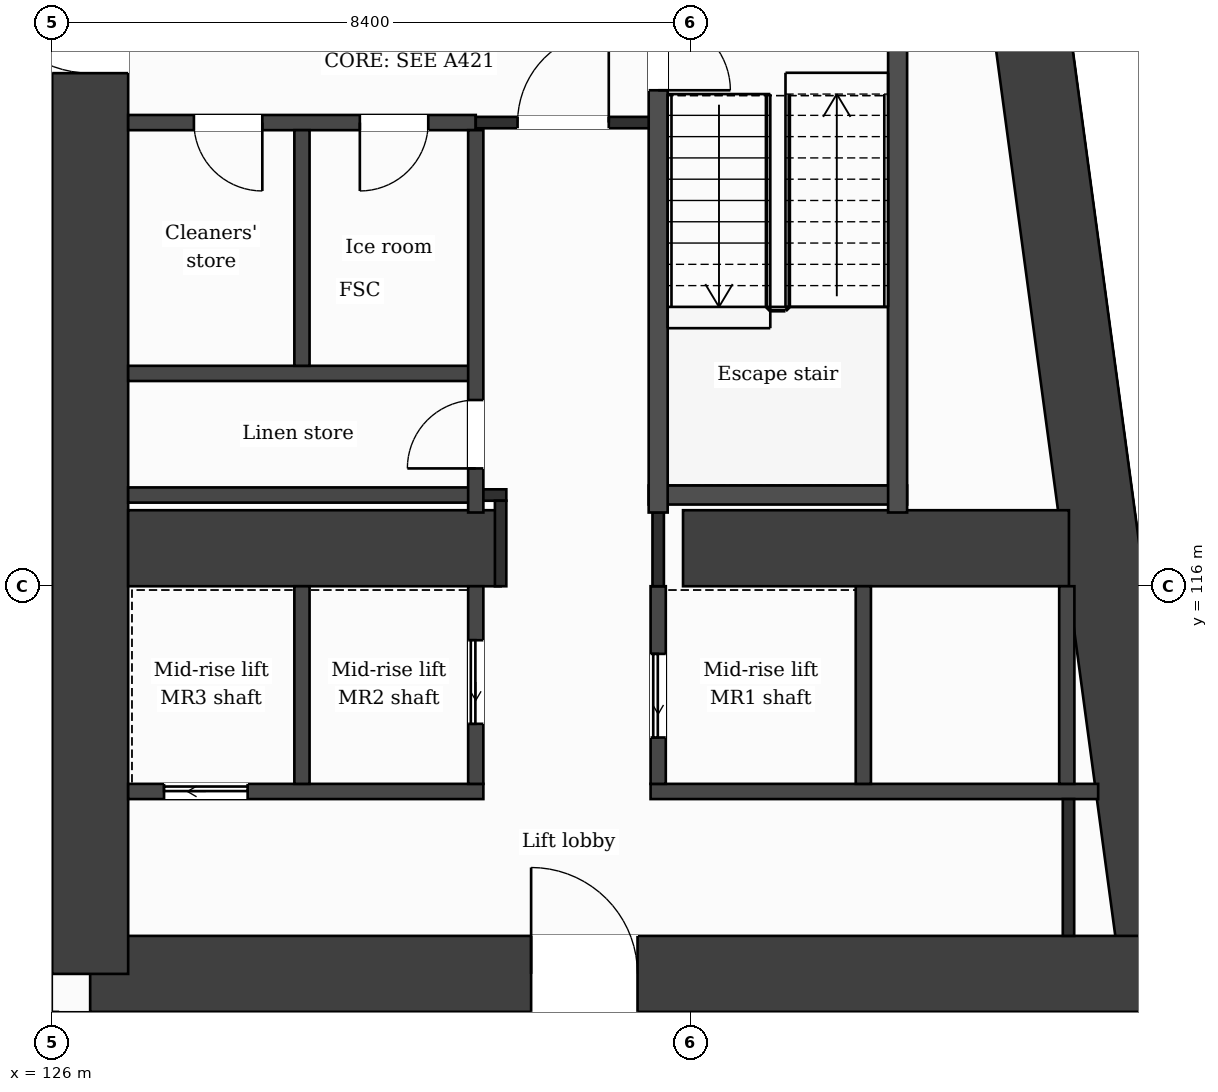
"""IFC4 building model, lengths in metres.
Left out: names, types, materials, properties, quantities, classifications, styles, units other than length and angle.
Written with IfcOpenShell. Run it as: python <this file> out.ifc"""

import sys

from ifc_helpers import new_model, si_unit, direction, frame, frame_2d, origin, place, context, subcontext, project, spatial, rectangle, extrude, element, fill, save


model = new_model("IFC4")
c1 = context("Model", 3, precision=1e-05, world=origin(), true_north=direction((0.0, 1.0)))
c2 = subcontext(c1, "Body", "Model", "MODEL_VIEW")
j1 = project(units=[si_unit("LENGTHUNIT", "METRE"), si_unit("PLANEANGLEUNIT", "RADIAN")], contexts=[c1])
p1 = place(None, origin())
s1 = spatial("IfcSite", under=j1, at=p1, CompositionType="ELEMENT")
p2 = place(p1, origin())
s2 = spatial("IfcBuilding", under=s1, at=p2, CompositionType="ELEMENT")
p3 = place(p2, frame((0.0, 0.0, 91.0)))
s3 = spatial("IfcBuildingStorey", under=s2, at=p3, CompositionType="ELEMENT", Elevation=91.0)
p4 = place(p3, frame((137.732, 131.9, 0.0), z_axis=(0.0, 0.0, 1.0), x_axis=(0.133411141623, -0.991060778808, 0.0)))
e1 = element("IfcWall", 1, at=p4, inside=s3, PredefinedType="SHEAR", context=c2, shape_type="SweptSolid", body=[
    extrude(rectangle(XDim=21.189, YDim=1.0, at=frame_2d((10.595, 0.0))), origin(), (0.0, 0.0, 1.0), 3.7),
])
p5 = place(p3, frame((140.559, 110.9, 0.0), z_axis=(0.0, 0.0, 1.0), x_axis=(-1.0, 0.0, 0.0)))
e2 = element("IfcWall", 2, at=p5, inside=s3, PredefinedType="SHEAR", context=c2, shape_type="SweptSolid", body=[
    extrude(rectangle(XDim=14.059, YDim=1.0, at=frame_2d((7.029, 0.0))), origin(), (0.0, 0.0, 1.0), 3.7),
])
p6 = place(p5, frame((6.858, 0.0, 0.0)))
e3 = element("IfcOpeningElement", 3, at=p6, cuts=e2, PredefinedType="OPENING", context=c2, shape_type="SweptSolid", body=[
    extrude(rectangle(XDim=1.4, YDim=2.1, at=frame_2d((0.7, 1.05))), frame((0.0, 0.51, 0.0), z_axis=(0.0, -1.0, 0.0), x_axis=(1.0, 0.0, 0.0)), (0.0, 0.0, 1.0), 1.02),
])
p7 = place(p3, frame((126.5, 110.9, 0.0), z_axis=(0.0, 0.0, 1.0), x_axis=(0.0, 1.0, 0.0)))
e4 = element("IfcWall", 4, at=p7, inside=s3, PredefinedType="SHEAR", context=c2, shape_type="SweptSolid", body=[
    extrude(rectangle(XDim=21.0, YDim=1.0, at=frame_2d((10.5, 0.0))), origin(), (0.0, 0.0, 1.0), 3.7),
])
p8 = place(p7, frame((11.85, 0.0, 0.0)))
e5 = element("IfcOpeningElement", 5, at=p8, cuts=e4, PredefinedType="OPENING", context=c2, shape_type="SweptSolid", body=[
    extrude(rectangle(XDim=1.4, YDim=2.1, at=frame_2d((0.7, 1.05))), frame((0.0, 0.51, 0.0), z_axis=(0.0, -1.0, 0.0), x_axis=(1.0, 0.0, 0.0)), (0.0, 0.0, 1.0), 1.02),
])
p9 = place(p3, frame((127.0, 116.5, 0.0), z_axis=(0.0, 0.0, 1.0), x_axis=(1.0, 0.0, 0.0)))
e6 = element("IfcWall", 6, at=p9, inside=s3, PredefinedType="SHEAR", context=c2, shape_type="SweptSolid", body=[
    extrude(rectangle(XDim=4.9, YDim=1.0, at=frame_2d((2.45, 0.0))), origin(), (0.0, 0.0, 1.0), 3.7),
])
p10 = place(p3, frame((134.3, 116.5, 0.0), z_axis=(0.0, 0.0, 1.0), x_axis=(1.0, 0.0, 0.0)))
e7 = element("IfcWall", 7, at=p10, inside=s3, PredefinedType="SHEAR", context=c2, shape_type="SweptSolid", body=[
    extrude(rectangle(XDim=5.077, YDim=1.0, at=frame_2d((2.539, 0.0))), origin(), (0.0, 0.0, 1.0), 3.7),
])
p11 = place(p3, frame((140.348, 103.85, 0.0), z_axis=(0.0, 0.0, 1.0), x_axis=(-0.133431549479, 0.991058031401, 0.0)))
e8 = element("IfcWall", 8, at=p11, inside=s3, PredefinedType="SOLIDWALL", context=c2, shape_type="SweptSolid", body=[
    extrude(rectangle(XDim=6.609, YDim=0.3, at=frame_2d((3.304, 0.0))), origin(), (0.0, 0.0, 1.0), 3.38),
])
p12 = place(p11, frame((0.737, 0.0, 0.9)))
e9 = element("IfcOpeningElement", 9, at=p12, cuts=e8, PredefinedType="OPENING", context=c2, shape_type="SweptSolid", body=[
    extrude(rectangle(XDim=1.2, YDim=2.1, at=frame_2d((0.6, 1.05))), frame((0.0, 0.16, 0.0), z_axis=(0.0, -1.0, 0.0), x_axis=(1.0, 0.0, 0.0)), (0.0, 0.0, 1.0), 0.32),
])
p13 = place(p11, frame((3.991, 0.0, 0.0)))
e10 = element("IfcOpeningElement", 10, at=p13, cuts=e8, PredefinedType="OPENING", context=c2, shape_type="SweptSolid", body=[
    extrude(rectangle(XDim=1.2, YDim=2.4, at=frame_2d((0.6, 1.2))), frame((0.0, 0.16, 0.0), z_axis=(0.0, -1.0, 0.0), x_axis=(1.0, 0.0, 0.0)), (0.0, 0.0, 1.0), 0.32),
])
p14 = place(p3, frame((127.0, 113.3, 0.0), z_axis=(0.0, 0.0, 1.0), x_axis=(1.0, 0.0, 0.0)))
e11 = element("IfcWall", 11, at=p14, inside=s3, PredefinedType="PARTITIONING", context=c2, shape_type="SweptSolid", body=[
    extrude(rectangle(XDim=4.673, YDim=0.2, at=frame_2d((2.336, 0.0))), origin(), (0.0, 0.0, 1.0), 3.38),
])
p15 = place(p14, frame((0.472, 0.0, 0.0)))
e12 = element("IfcOpeningElement", 12, at=p15, cuts=e11, PredefinedType="OPENING", context=c2, shape_type="SweptSolid", body=[
    extrude(rectangle(XDim=1.1, YDim=2.1, at=frame_2d((0.55, 1.05))), frame((0.0, 0.11, 0.0), z_axis=(0.0, -1.0, 0.0), x_axis=(1.0, 0.0, 0.0)), (0.0, 0.0, 1.0), 0.22),
])
p16 = place(p3, frame((133.873, 113.3, 0.0), z_axis=(0.0, 0.0, 1.0), x_axis=(1.0, 0.0, 0.0)))
e13 = element("IfcWall", 13, at=p16, inside=s3, PredefinedType="PARTITIONING", context=c2, shape_type="SweptSolid", body=[
    extrude(rectangle(XDim=5.888, YDim=0.2, at=frame_2d((2.944, 0.0))), origin(), (0.0, 0.0, 1.0), 3.38),
])
p17 = place(p3, frame((127.0, 117.2, 0.0), z_axis=(0.0, 0.0, 1.0), x_axis=(1.0, 0.0, 0.0)))
e14 = element("IfcWall", 14, at=p17, inside=s3, PredefinedType="PARTITIONING", context=c2, shape_type="SweptSolid", body=[
    extrude(rectangle(XDim=4.573, YDim=0.2, at=frame_2d((2.287, 0.0))), origin(), (0.0, 0.0, 1.0), 3.38),
])
p18 = place(p3, frame((131.573, 117.2, 0.0), z_axis=(0.0, 0.0, 1.0), x_axis=(1.0, 0.0, 0.0)))
e15 = element("IfcWall", 15, at=p18, inside=s3, PredefinedType="PARTITIONING", context=c2, shape_type="SweptSolid", body=[
    extrude(rectangle(XDim=0.402, YDim=0.15, at=frame_2d((0.201, 0.0))), origin(), (0.0, 0.0, 1.0), 3.38),
])
p19 = place(p3, frame((133.848, 117.2, 0.0), z_axis=(0.0, 0.0, 1.0), x_axis=(1.0, 0.0, 0.0)))
e16 = element("IfcWall", 16, at=p19, inside=s3, PredefinedType="PARTITIONING", context=c2, shape_type="SweptSolid", body=[
    extrude(rectangle(XDim=3.4, YDim=0.25, at=frame_2d((1.7, 0.0))), origin(), (0.0, 0.0, 1.0), 3.38),
])
p20 = place(p3, frame((127.0, 118.8, 0.0), z_axis=(0.0, 0.0, 1.0), x_axis=(1.0, 0.0, 0.0)))
e17 = element("IfcWall", 17, at=p20, inside=s3, PredefinedType="PARTITIONING", context=c2, shape_type="SweptSolid", body=[
    extrude(rectangle(XDim=4.573, YDim=0.2, at=frame_2d((2.287, 0.0))), origin(), (0.0, 0.0, 1.0), 3.38),
])
p21 = place(p3, frame((127.0, 122.1, 0.0), z_axis=(0.0, 0.0, 1.0), x_axis=(1.0, 0.0, 0.0)))
e18 = element("IfcWall", 18, at=p21, inside=s3, PredefinedType="PARTITIONING", context=c2, shape_type="SweptSolid", body=[
    extrude(rectangle(XDim=4.573, YDim=0.2, at=frame_2d((2.287, 0.0))), origin(), (0.0, 0.0, 1.0), 3.38),
])
p22 = place(p21, frame((3.048, 0.0, 0.0)))
e19 = element("IfcOpeningElement", 19, at=p22, cuts=e18, PredefinedType="OPENING", context=c2, shape_type="SweptSolid", body=[
    extrude(rectangle(XDim=0.9, YDim=2.1, at=frame_2d((0.45, 1.05))), frame((0.0, 0.11, 0.0), z_axis=(0.0, -1.0, 0.0), x_axis=(1.0, 0.0, 0.0)), (0.0, 0.0, 1.0), 0.22),
])
p23 = place(p21, frame((0.865, 0.0, 0.0)))
e20 = element("IfcOpeningElement", 20, at=p23, cuts=e18, PredefinedType="OPENING", context=c2, shape_type="SweptSolid", body=[
    extrude(rectangle(XDim=0.9, YDim=2.1, at=frame_2d((0.45, 1.05))), frame((0.0, 0.11, 0.0), z_axis=(0.0, -1.0, 0.0), x_axis=(1.0, 0.0, 0.0)), (0.0, 0.0, 1.0), 0.22),
])
p24 = place(p3, frame((131.573, 122.1, 0.0), z_axis=(0.0, 0.0, 1.0), x_axis=(1.0, 0.0, 0.0)))
e21 = element("IfcWall", 21, at=p24, inside=s3, PredefinedType="PARTITIONING", context=c2, shape_type="SweptSolid", body=[
    extrude(rectangle(XDim=2.4, YDim=0.15, at=frame_2d((1.2, 0.0))), origin(), (0.0, 0.0, 1.0), 3.38),
])
p25 = place(p24, frame((0.55, 0.0, 0.0)))
e22 = element("IfcOpeningElement", 22, at=p25, cuts=e21, PredefinedType="OPENING", context=c2, shape_type="SweptSolid", body=[
    extrude(rectangle(XDim=1.2, YDim=2.1, at=frame_2d((0.6, 1.05))), frame((0.0, 0.085, 0.0), z_axis=(0.0, -1.0, 0.0), x_axis=(1.0, 0.0, 0.0)), (0.0, 0.0, 1.0), 0.17),
])
p26 = place(p3, frame((100.8, 122.45, 0.0), z_axis=(0.0, 0.0, 1.0), x_axis=(1.0, 0.0, 0.0)))
e23 = element("IfcWall", 23, at=p26, inside=s3, PredefinedType="PARTITIONING", context=c2, shape_type="SweptSolid", body=[
    extrude(rectangle(XDim=25.2, YDim=0.15, at=frame_2d((12.6, 0.0))), origin(), (0.0, 0.0, 1.0), 3.38),
])
p27 = place(p3, frame((126.0, 109.075, 0.0), z_axis=(0.0, 0.0, 1.0), x_axis=(0.0, 1.0, 0.0)))
e24 = element("IfcWall", 24, at=p27, inside=s3, PredefinedType="PARTITIONING", context=c2, shape_type="SweptSolid", body=[
    extrude(rectangle(XDim=1.325, YDim=0.15, at=frame_2d((0.663, 0.0))), origin(), (0.0, 0.0, 1.0), 3.38),
])
p28 = place(p3, frame((129.287, 113.4, 0.0), z_axis=(0.0, 0.0, 1.0), x_axis=(0.0, 1.0, 0.0)))
e25 = element("IfcWall", 25, at=p28, inside=s3, PredefinedType="PARTITIONING", context=c2, shape_type="SweptSolid", body=[
    extrude(rectangle(XDim=2.6, YDim=0.2, at=frame_2d((1.3, 0.0))), origin(), (0.0, 0.0, 1.0), 3.38),
])
p29 = place(p3, frame((129.287, 118.9, 0.0), z_axis=(0.0, 0.0, 1.0), x_axis=(0.0, 1.0, 0.0)))
e26 = element("IfcWall", 26, at=p29, inside=s3, PredefinedType="PARTITIONING", context=c2, shape_type="SweptSolid", body=[
    extrude(rectangle(XDim=3.1, YDim=0.2, at=frame_2d((1.55, 0.0))), origin(), (0.0, 0.0, 1.0), 3.38),
])
p30 = place(p3, frame((131.573, 113.4, 0.0), z_axis=(0.0, 0.0, 1.0), x_axis=(0.0, 1.0, 0.0)))
e27 = element("IfcWall", 27, at=p30, inside=s3, PredefinedType="PARTITIONING", context=c2, shape_type="SweptSolid", body=[
    extrude(rectangle(XDim=2.6, YDim=0.2, at=frame_2d((1.3, 0.0))), origin(), (0.0, 0.0, 1.0), 3.38),
])
p31 = place(p30, frame((0.79, 0.0, 0.0)))
e28 = element("IfcOpeningElement", 28, at=p31, cuts=e27, PredefinedType="OPENING", context=c2, shape_type="SweptSolid", body=[
    extrude(rectangle(XDim=1.1, YDim=2.1, at=frame_2d((0.55, 1.05))), frame((0.0, 0.11, 0.0), z_axis=(0.0, -1.0, 0.0), x_axis=(1.0, 0.0, 0.0)), (0.0, 0.0, 1.0), 0.22),
])
p32 = place(p3, frame((131.573, 116.97, 0.0), z_axis=(0.0, 0.0, 1.0), x_axis=(0.0, 1.0, 0.0)))
e29 = element("IfcWall", 29, at=p32, inside=s3, PredefinedType="PARTITIONING", context=c2, shape_type="SweptSolid", body=[
    extrude(rectangle(XDim=5.03, YDim=0.2, at=frame_2d((2.515, 0.0))), origin(), (0.0, 0.0, 1.0), 3.38),
])
p33 = place(p32, frame((0.58, 0.0, 0.0)))
e30 = element("IfcOpeningElement", 30, at=p33, cuts=e29, PredefinedType="OPENING", context=c2, shape_type="SweptSolid", body=[
    extrude(rectangle(XDim=0.9, YDim=2.1, at=frame_2d((0.45, 1.05))), frame((0.0, 0.11, 0.0), z_axis=(0.0, -1.0, 0.0), x_axis=(1.0, 0.0, 0.0)), (0.0, 0.0, 1.0), 0.22),
])
p34 = place(p3, frame((131.9, 116.0, 0.0), z_axis=(0.0, 0.0, 1.0), x_axis=(0.0, 1.0, 0.0)))
e31 = element("IfcWall", 31, at=p34, inside=s3, PredefinedType="PARTITIONING", context=c2, shape_type="SweptSolid", body=[
    extrude(rectangle(XDim=1.125, YDim=0.15, at=frame_2d((0.562, 0.0))), origin(), (0.0, 0.0, 1.0), 3.38),
])
p35 = place(p3, frame((133.973, 113.4, 0.0), z_axis=(0.0, 0.0, 1.0), x_axis=(0.0, 1.0, 0.0)))
e32 = element("IfcWall", 32, at=p35, inside=s3, PredefinedType="PARTITIONING", context=c2, shape_type="SweptSolid", body=[
    extrude(rectangle(XDim=2.6, YDim=0.2, at=frame_2d((1.3, 0.0))), origin(), (0.0, 0.0, 1.0), 3.38),
])
p36 = place(p35, frame((0.61, 0.0, 0.0)))
e33 = element("IfcOpeningElement", 33, at=p36, cuts=e32, PredefinedType="OPENING", context=c2, shape_type="SweptSolid", body=[
    extrude(rectangle(XDim=1.1, YDim=2.1, at=frame_2d((0.55, 1.05))), frame((0.0, 0.11, 0.0), z_axis=(0.0, -1.0, 0.0), x_axis=(1.0, 0.0, 0.0)), (0.0, 0.0, 1.0), 0.22),
])
p37 = place(p3, frame((133.973, 116.0, 0.0), z_axis=(0.0, 0.0, 1.0), x_axis=(0.0, 1.0, 0.0)))
e34 = element("IfcWall", 34, at=p37, inside=s3, PredefinedType="PARTITIONING", context=c2, shape_type="SweptSolid", body=[
    extrude(rectangle(XDim=0.97, YDim=0.15, at=frame_2d((0.485, 0.0))), origin(), (0.0, 0.0, 1.0), 3.38),
])
p38 = place(p3, frame((133.973, 116.97, 0.0), z_axis=(0.0, 0.0, 1.0), x_axis=(0.0, 1.0, 0.0)))
e35 = element("IfcWall", 35, at=p38, inside=s3, PredefinedType="PARTITIONING", context=c2, shape_type="SweptSolid", body=[
    extrude(rectangle(XDim=6.855, YDim=0.25, at=frame_2d((3.427, 0.0))), origin(), (0.0, 0.0, 1.0), 3.38),
])
p39 = place(p38, frame((5.555, 0.0, 0.0)))
e36 = element("IfcOpeningElement", 36, at=p39, cuts=e35, PredefinedType="OPENING", context=c2, shape_type="SweptSolid", body=[
    extrude(rectangle(XDim=0.95, YDim=2.1, at=frame_2d((0.475, 1.05))), frame((0.0, 0.135, 0.0), z_axis=(0.0, -1.0, 0.0), x_axis=(1.0, 0.0, 0.0)), (0.0, 0.0, 1.0), 0.27),
])
p40 = place(p3, frame((136.672, 113.4, 0.0), z_axis=(0.0, 0.0, 1.0), x_axis=(0.0, 1.0, 0.0)))
e37 = element("IfcWall", 37, at=p40, inside=s3, PredefinedType="PARTITIONING", context=c2, shape_type="SweptSolid", body=[
    extrude(rectangle(XDim=2.6, YDim=0.2, at=frame_2d((1.3, 0.0))), origin(), (0.0, 0.0, 1.0), 3.38),
])
p41 = place(p3, frame((137.123, 116.97, 0.0), z_axis=(0.0, 0.0, 1.0), x_axis=(0.0, 1.0, 0.0)))
e38 = element("IfcWall", 38, at=p41, inside=s3, PredefinedType="PARTITIONING", context=c2, shape_type="SweptSolid", body=[
    extrude(rectangle(XDim=6.855, YDim=0.25, at=frame_2d((3.427, 0.0))), origin(), (0.0, 0.0, 1.0), 3.38),
])
p42 = place(p3, frame((139.349, 113.4, 0.0), z_axis=(0.0, 0.0, 1.0), x_axis=(0.0, 1.0, 0.0)))
e39 = element("IfcWall", 39, at=p42, inside=s3, PredefinedType="PARTITIONING", context=c2, shape_type="SweptSolid", body=[
    extrude(rectangle(XDim=2.6, YDim=0.2, at=frame_2d((1.3, 0.0))), origin(), (0.0, 0.0, 1.0), 3.38),
])
p43 = place(p3, frame((139.371, 111.4, 0.0), z_axis=(0.0, 0.0, 1.0), x_axis=(0.0, 1.0, 0.0)))
e40 = element("IfcWall", 40, at=p43, inside=s3, PredefinedType="PARTITIONING", context=c2, shape_type="SweptSolid", body=[
    extrude(rectangle(XDim=1.8, YDim=0.15, at=frame_2d((0.9, 0.0))), origin(), (0.0, 0.0, 1.0), 3.38),
])
p44 = place(p25, origin())
e41 = element("IfcDoor", 41, at=p44, inside=s3, OperationType="SINGLE_SWING_RIGHT", PredefinedType="DOOR", context=c2, shape_type="SweptSolid", body=[
    extrude(rectangle(XDim=1.2, YDim=2.1, at=frame_2d((0.6, 1.05))), frame((0.0, 0.025, 0.0), z_axis=(0.0, -1.0, 0.0), x_axis=(1.0, 0.0, 0.0)), (0.0, 0.0, 1.0), 0.05),
])
fill(e22, e41)
p45 = place(p22, origin())
e42 = element("IfcDoor", 42, at=p45, inside=s3, OperationType="SINGLE_SWING_LEFT", PredefinedType="DOOR", context=c2, shape_type="SweptSolid", body=[
    extrude(rectangle(XDim=0.9, YDim=2.1, at=frame_2d((0.45, 1.05))), frame((0.0, 0.025, 0.0), z_axis=(0.0, -1.0, 0.0), x_axis=(1.0, 0.0, 0.0)), (0.0, 0.0, 1.0), 0.05),
])
fill(e19, e42)
p46 = place(p23, origin())
e43 = element("IfcDoor", 43, at=p46, inside=s3, OperationType="SINGLE_SWING_RIGHT", PredefinedType="DOOR", context=c2, shape_type="SweptSolid", body=[
    extrude(rectangle(XDim=0.9, YDim=2.1, at=frame_2d((0.45, 1.05))), frame((0.0, 0.025, 0.0), z_axis=(0.0, -1.0, 0.0), x_axis=(1.0, 0.0, 0.0)), (0.0, 0.0, 1.0), 0.05),
])
fill(e20, e43)
p47 = place(p39, origin())
e44 = element("IfcDoor", 44, at=p47, inside=s3, OperationType="SINGLE_SWING_LEFT", PredefinedType="DOOR", context=c2, shape_type="SweptSolid", body=[
    extrude(rectangle(XDim=0.95, YDim=2.1, at=frame_2d((0.475, 1.05))), frame((0.0, 0.025, 0.0), z_axis=(0.0, -1.0, 0.0), x_axis=(1.0, 0.0, 0.0)), (0.0, 0.0, 1.0), 0.05),
])
fill(e36, e44)
p48 = place(p33, origin())
e45 = element("IfcDoor", 45, at=p48, inside=s3, OperationType="SINGLE_SWING_LEFT", PredefinedType="DOOR", context=c2, shape_type="SweptSolid", body=[
    extrude(rectangle(XDim=0.9, YDim=2.1, at=frame_2d((0.45, 1.05))), frame((0.0, 0.025, 0.0), z_axis=(0.0, -1.0, 0.0), x_axis=(1.0, 0.0, 0.0)), (0.0, 0.0, 1.0), 0.05),
])
fill(e30, e45)
p49 = place(p36, origin())
e46 = element("IfcDoor", 46, at=p49, inside=s3, OperationType="SLIDING_TO_LEFT", PredefinedType="DOOR", context=c2, shape_type="SweptSolid", body=[
    extrude(rectangle(XDim=1.1, YDim=2.1, at=frame_2d((0.55, 1.05))), frame((0.0, 0.025, 0.0), z_axis=(0.0, -1.0, 0.0), x_axis=(1.0, 0.0, 0.0)), (0.0, 0.0, 1.0), 0.05),
])
fill(e33, e46)
p50 = place(p31, origin())
e47 = element("IfcDoor", 47, at=p50, inside=s3, OperationType="SLIDING_TO_LEFT", PredefinedType="DOOR", context=c2, shape_type="SweptSolid", body=[
    extrude(rectangle(XDim=1.1, YDim=2.1, at=frame_2d((0.55, 1.05))), frame((0.0, 0.025, 0.0), z_axis=(0.0, -1.0, 0.0), x_axis=(1.0, 0.0, 0.0)), (0.0, 0.0, 1.0), 0.05),
])
fill(e28, e47)
p51 = place(p15, origin())
e48 = element("IfcDoor", 48, at=p51, inside=s3, OperationType="SLIDING_TO_LEFT", PredefinedType="DOOR", context=c2, shape_type="SweptSolid", body=[
    extrude(rectangle(XDim=1.1, YDim=2.1, at=frame_2d((0.55, 1.05))), frame((0.0, 0.025, 0.0), z_axis=(0.0, -1.0, 0.0), x_axis=(1.0, 0.0, 0.0)), (0.0, 0.0, 1.0), 0.05),
])
fill(e12, e48)
p52 = place(p6, origin())
e49 = element("IfcDoor", 49, at=p52, inside=s3, OperationType="SINGLE_SWING_RIGHT", PredefinedType="DOOR", context=c2, shape_type="SweptSolid", body=[
    extrude(rectangle(XDim=1.4, YDim=2.1, at=frame_2d((0.7, 1.05))), frame((0.0, 0.025, 0.0), z_axis=(0.0, -1.0, 0.0), x_axis=(1.0, 0.0, 0.0)), (0.0, 0.0, 1.0), 0.05),
])
fill(e3, e49)
p53 = place(p8, origin())
e50 = element("IfcDoor", 50, at=p53, inside=s3, OperationType="SINGLE_SWING_RIGHT", PredefinedType="DOOR", context=c2, shape_type="SweptSolid", body=[
    extrude(rectangle(XDim=1.4, YDim=2.1, at=frame_2d((0.7, 1.05))), frame((0.0, 0.025, 0.0), z_axis=(0.0, -1.0, 0.0), x_axis=(1.0, 0.0, 0.0)), (0.0, 0.0, 1.0), 0.05),
])
fill(e5, e50)
save(model, sys.argv[1])
